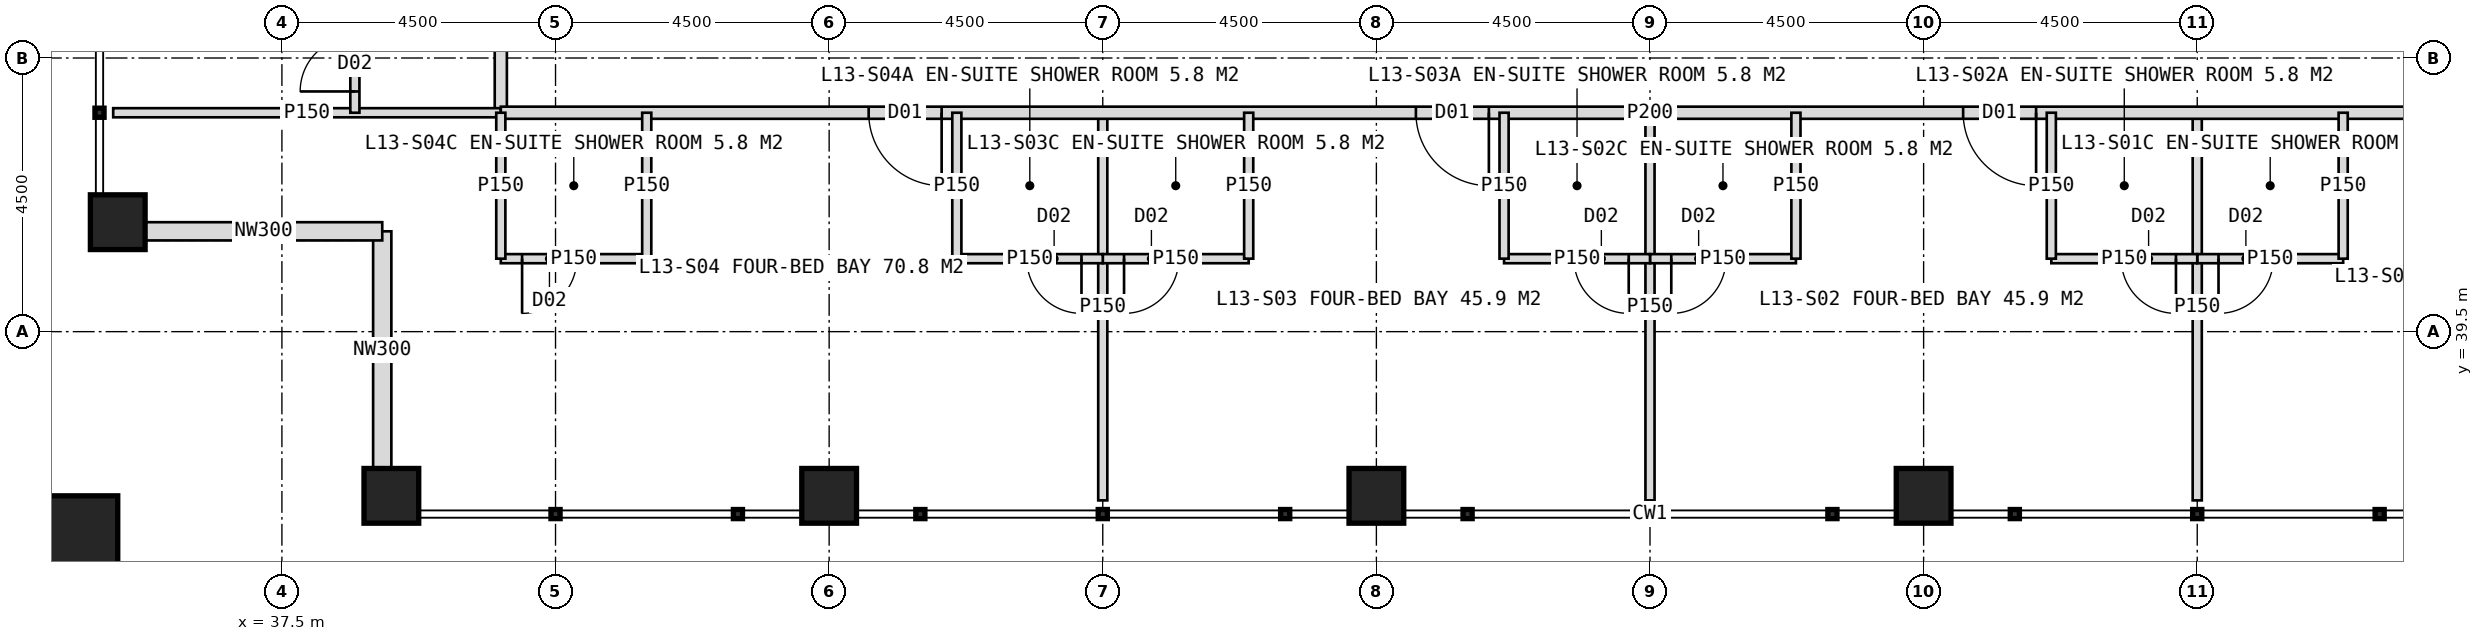
"""IFC4 building model, lengths in metres.
Left out: names, types, materials, properties, quantities, classifications, styles, units other than length and angle.
Written with IfcOpenShell. Run it as: python <this file> out.ifc"""

import sys

from ifc_helpers import new_model, si_unit, direction, frame, frame_2d, origin, origin_2d, place, context, subcontext, project, spatial, rectangle, hollow_rectangle, extrude, element, fill, save


model = new_model("IFC4")
c1 = context("Model", 3, precision=1e-05, world=origin(), true_north=direction((0.0, 1.0)))
c2 = subcontext(c1, "Body", "Model", "MODEL_VIEW")
j1 = project(units=[si_unit("LENGTHUNIT", "METRE"), si_unit("PLANEANGLEUNIT", "RADIAN")], contexts=[c1])
p1 = place(None, origin())
s1 = spatial("IfcSite", under=j1, at=p1, CompositionType="ELEMENT")
p2 = place(p1, origin())
s2 = spatial("IfcBuilding", under=s1, at=p2, CompositionType="ELEMENT")
p3 = place(p2, frame((0.0, 0.0, 59.0)))
s3 = spatial("IfcBuildingStorey", under=s2, at=p3, CompositionType="ELEMENT", Elevation=59.0)
for number, where, z_axis, x_axis in (
    (1, (39.3, 36.8, 0.0), (0.0, 0.0, 1.0), (1.0, 0.0, 0.0)),
    (2, (34.8, 41.3, 0.0), (0.0, 0.0, 1.0), (1.0, 0.0, 0.0)),
    (3, (46.5, 36.8, 0.0), (0.0, 0.0, 1.0), (1.0, 0.0, 0.0)),
    (4, (55.5, 36.8, 0.0), (0.0, 0.0, 1.0), (1.0, 0.0, 0.0)),
    (5, (64.5, 36.8, 0.0), (0.0, 0.0, 1.0), (1.0, 0.0, 0.0)),
):
    element("IfcColumn", number, at=place(p3, frame(where, z_axis=z_axis, x_axis=x_axis)), inside=s3, PredefinedType="COLUMN", context=c2, shape_type="SweptSolid", body=[
        extrude(hollow_rectangle(XDim=0.9, YDim=0.9, WallThickness=0.08, at=origin_2d()), origin(), (0.0, 0.0, 1.0), 4.0),
    ])
p4 = place(p3, frame((33.9, 35.9, 0.0), z_axis=(0.0, 0.0, 1.0), x_axis=(1.0, 0.0, 0.0)))
e6 = element("IfcColumn", 6, at=p4, inside=s3, PredefinedType="COLUMN", context=c2, shape_type="SweptSolid", body=[
    extrude(hollow_rectangle(XDim=1.8, YDim=1.8, WallThickness=0.1, at=origin_2d()), origin(), (0.0, 0.0, 1.0), 4.0),
])
for number, where, z_axis, x_axis in (
    (7, (39.15, 37.25, 0.0), (0.0, 0.0, 1.0), (0.0, 1.0, 0.0)),
    (8, (39.15, 41.15, 0.0), (0.0, 0.0, 1.0), (-1.0, 0.0, 0.0)),
):
    element("IfcWall", number, at=place(p3, frame(where, z_axis=z_axis, x_axis=x_axis)), inside=s3, PredefinedType="ELEMENTEDWALL", context=c2, shape_type="SweptSolid", body=[
        extrude(rectangle(XDim=3.9, YDim=0.3, at=frame_2d((1.95, 0.0))), origin(), (0.0, 0.0, 1.0), 2.95),
    ])
p5 = place(p3, frame((41.1, 43.1, 0.0), z_axis=(0.0, 0.0, 1.0), x_axis=(0.0, 1.0, 0.0)))
e9 = element("IfcWall", 9, at=p5, inside=s3, PredefinedType="PARTITIONING", context=c2, shape_type="SweptSolid", body=[
    extrude(rectangle(XDim=37.8, YDim=0.2, at=frame_2d((18.9, 0.0))), origin(), (0.0, 0.0, 1.0), 3.75),
])
p6 = place(p5, frame((3.25, 0.0, 0.0)))
e10 = element("IfcOpeningElement", 10, at=p6, cuts=e9, PredefinedType="OPENING", context=c2, shape_type="SweptSolid", body=[
    extrude(rectangle(XDim=1.2, YDim=2.2, at=frame_2d((0.6, 1.1))), frame((0.0, 0.11, 0.0), z_axis=(0.0, -1.0, 0.0), x_axis=(1.0, 0.0, 0.0)), (0.0, 0.0, 1.0), 0.22),
])
p7 = place(p5, frame((9.55, 0.0, 0.0)))
e11 = element("IfcOpeningElement", 11, at=p7, cuts=e9, PredefinedType="OPENING", context=c2, shape_type="SweptSolid", body=[
    extrude(rectangle(XDim=1.2, YDim=2.2, at=frame_2d((0.6, 1.1))), frame((0.0, 0.11, 0.0), z_axis=(0.0, -1.0, 0.0), x_axis=(1.0, 0.0, 0.0)), (0.0, 0.0, 1.0), 0.22),
])
p8 = place(p5, frame((15.55, 0.0, 0.0)))
e12 = element("IfcOpeningElement", 12, at=p8, cuts=e9, PredefinedType="OPENING", context=c2, shape_type="SweptSolid", body=[
    extrude(rectangle(XDim=1.2, YDim=2.2, at=frame_2d((0.6, 1.1))), frame((0.0, 0.11, 0.0), z_axis=(0.0, -1.0, 0.0), x_axis=(1.0, 0.0, 0.0)), (0.0, 0.0, 1.0), 0.22),
])
p9 = place(p5, frame((21.55, 0.0, 0.0)))
e13 = element("IfcOpeningElement", 13, at=p9, cuts=e9, PredefinedType="OPENING", context=c2, shape_type="SweptSolid", body=[
    extrude(rectangle(XDim=1.2, YDim=2.2, at=frame_2d((0.6, 1.1))), frame((0.0, 0.11, 0.0), z_axis=(0.0, -1.0, 0.0), x_axis=(1.0, 0.0, 0.0)), (0.0, 0.0, 1.0), 0.22),
])
p10 = place(p5, frame((27.55, 0.0, 0.0)))
e14 = element("IfcOpeningElement", 14, at=p10, cuts=e9, PredefinedType="OPENING", context=c2, shape_type="SweptSolid", body=[
    extrude(rectangle(XDim=1.2, YDim=2.2, at=frame_2d((0.6, 1.1))), frame((0.0, 0.11, 0.0), z_axis=(0.0, -1.0, 0.0), x_axis=(1.0, 0.0, 0.0)), (0.0, 0.0, 1.0), 0.22),
])
p11 = place(p3, frame((41.1, 43.1, 0.0), z_axis=(0.0, 0.0, 1.0), x_axis=(-1.0, 0.0, 0.0)))
e15 = element("IfcWall", 15, at=p11, inside=s3, PredefinedType="PARTITIONING", context=c2, shape_type="SweptSolid", body=[
    extrude(rectangle(XDim=6.375, YDim=0.15, at=frame_2d((3.188, 0.0))), origin(), (0.0, 0.0, 1.0), 3.75),
])
p12 = place(p3, frame((38.7, 43.1, 0.0), z_axis=(0.0, 0.0, 1.0), x_axis=(0.0, 1.0, 0.0)))
e16 = element("IfcWall", 16, at=p12, inside=s3, PredefinedType="PARTITIONING", context=c2, shape_type="SweptSolid", body=[
    extrude(rectangle(XDim=3.0, YDim=0.15, at=frame_2d((1.5, 0.0))), origin(), (0.0, 0.0, 1.0), 3.75),
])
p13 = place(p12, frame((0.35, 0.0, 0.0)))
e17 = element("IfcOpeningElement", 17, at=p13, cuts=e16, PredefinedType="OPENING", context=c2, shape_type="SweptSolid", body=[
    extrude(rectangle(XDim=0.9, YDim=2.1, at=frame_2d((0.45, 1.05))), frame((0.0, 0.085, 0.0), z_axis=(0.0, -1.0, 0.0), x_axis=(1.0, 0.0, 0.0)), (0.0, 0.0, 1.0), 0.17),
])
p14 = place(p3, frame((69.0, 43.1, 0.0), z_axis=(0.0, 0.0, 1.0), x_axis=(0.0, -1.0, 0.0)))
e18 = element("IfcWall", 18, at=p14, inside=s3, PredefinedType="PARTITIONING", context=c2, shape_type="SweptSolid", body=[
    extrude(rectangle(XDim=6.375, YDim=0.15, at=frame_2d((3.188, 0.0))), origin(), (0.0, 0.0, 1.0), 3.75),
])
p15 = place(p3, frame((60.0, 43.1, 0.0), z_axis=(0.0, 0.0, 1.0), x_axis=(0.0, -1.0, 0.0)))
e19 = element("IfcWall", 19, at=p15, inside=s3, PredefinedType="PARTITIONING", context=c2, shape_type="SweptSolid", body=[
    extrude(rectangle(XDim=6.375, YDim=0.15, at=frame_2d((3.188, 0.0))), origin(), (0.0, 0.0, 1.0), 2.75),
])
p16 = place(p3, frame((51.0, 43.1, 0.0), z_axis=(0.0, 0.0, 1.0), x_axis=(0.0, -1.0, 0.0)))
e20 = element("IfcWall", 20, at=p16, inside=s3, PredefinedType="PARTITIONING", context=c2, shape_type="SweptSolid", body=[
    extrude(rectangle(XDim=6.375, YDim=0.15, at=frame_2d((3.188, 0.0))), origin(), (0.0, 0.0, 1.0), 3.75),
])
p17 = place(p3, frame((78.9, 43.1, 0.0), z_axis=(0.0, 0.0, 1.0), x_axis=(-1.0, 0.0, 0.0)))
e21 = element("IfcWall", 21, at=p17, inside=s3, PredefinedType="PARTITIONING", context=c2, shape_type="SweptSolid", body=[
    extrude(rectangle(XDim=37.8, YDim=0.2, at=frame_2d((18.9, 0.0))), origin(), (0.0, 0.0, 1.0), 3.75),
])
p18 = place(p17, frame((2.65, 0.0, 0.0)))
e22 = element("IfcOpeningElement", 22, at=p18, cuts=e21, PredefinedType="OPENING", context=c2, shape_type="SweptSolid", body=[
    extrude(rectangle(XDim=1.2, YDim=2.2, at=frame_2d((0.6, 1.1))), frame((0.0, 0.11, 0.0), z_axis=(0.0, -1.0, 0.0), x_axis=(1.0, 0.0, 0.0)), (0.0, 0.0, 1.0), 0.22),
])
p19 = place(p17, frame((12.55, 0.0, 0.0)))
e23 = element("IfcOpeningElement", 23, at=p19, cuts=e21, PredefinedType="OPENING", context=c2, shape_type="SweptSolid", body=[
    extrude(rectangle(XDim=1.2, YDim=2.2, at=frame_2d((0.6, 1.1))), frame((0.0, 0.11, 0.0), z_axis=(0.0, -1.0, 0.0), x_axis=(1.0, 0.0, 0.0)), (0.0, 0.0, 1.0), 0.22),
])
p20 = place(p17, frame((21.55, 0.0, 0.0)))
e24 = element("IfcOpeningElement", 24, at=p20, cuts=e21, PredefinedType="OPENING", context=c2, shape_type="SweptSolid", body=[
    extrude(rectangle(XDim=1.2, YDim=2.2, at=frame_2d((0.6, 1.1))), frame((0.0, 0.11, 0.0), z_axis=(0.0, -1.0, 0.0), x_axis=(1.0, 0.0, 0.0)), (0.0, 0.0, 1.0), 0.22),
])
p21 = place(p17, frame((30.55, 0.0, 0.0)))
e25 = element("IfcOpeningElement", 25, at=p21, cuts=e21, PredefinedType="OPENING", context=c2, shape_type="SweptSolid", body=[
    extrude(rectangle(XDim=1.2, YDim=2.2, at=frame_2d((0.6, 1.1))), frame((0.0, 0.11, 0.0), z_axis=(0.0, -1.0, 0.0), x_axis=(1.0, 0.0, 0.0)), (0.0, 0.0, 1.0), 0.22),
])
p22 = place(p3, frame((71.4, 40.7, 0.0), z_axis=(0.0, 0.0, 1.0), x_axis=(-1.0, 0.0, 0.0)))
e26 = element("IfcWall", 26, at=p22, inside=s3, PredefinedType="PARTITIONING", context=c2, shape_type="SweptSolid", body=[
    extrude(rectangle(XDim=2.4, YDim=0.15, at=frame_2d((1.2, 0.0))), origin(), (0.0, 0.0, 1.0), 3.75),
])
p23 = place(p22, frame((1.15, 0.0, 0.0)))
e27 = element("IfcOpeningElement", 27, at=p23, cuts=e26, PredefinedType="OPENING", context=c2, shape_type="SweptSolid", body=[
    extrude(rectangle(XDim=0.9, YDim=2.1, at=frame_2d((0.45, 1.05))), frame((0.0, 0.085, 0.0), z_axis=(0.0, -1.0, 0.0), x_axis=(1.0, 0.0, 0.0)), (0.0, 0.0, 1.0), 0.17),
])
p24 = place(p3, frame((71.4, 43.1, 0.0), z_axis=(0.0, 0.0, 1.0), x_axis=(0.0, -1.0, 0.0)))
e28 = element("IfcWall", 28, at=p24, inside=s3, PredefinedType="PARTITIONING", context=c2, shape_type="SweptSolid", body=[
    extrude(rectangle(XDim=2.4, YDim=0.15, at=frame_2d((1.2, 0.0))), origin(), (0.0, 0.0, 1.0), 3.75),
])
p25 = place(p3, frame((69.0, 40.7, 0.0), z_axis=(0.0, 0.0, 1.0), x_axis=(-1.0, 0.0, 0.0)))
e29 = element("IfcWall", 29, at=p25, inside=s3, PredefinedType="PARTITIONING", context=c2, shape_type="SweptSolid", body=[
    extrude(rectangle(XDim=2.4, YDim=0.15, at=frame_2d((1.2, 0.0))), origin(), (0.0, 0.0, 1.0), 3.75),
])
p26 = place(p25, frame((0.35, 0.0, 0.0)))
e30 = element("IfcOpeningElement", 30, at=p26, cuts=e29, PredefinedType="OPENING", context=c2, shape_type="SweptSolid", body=[
    extrude(rectangle(XDim=0.9, YDim=2.1, at=frame_2d((0.45, 1.05))), frame((0.0, 0.085, 0.0), z_axis=(0.0, -1.0, 0.0), x_axis=(1.0, 0.0, 0.0)), (0.0, 0.0, 1.0), 0.17),
])
p27 = place(p3, frame((66.6, 43.1, 0.0), z_axis=(0.0, 0.0, 1.0), x_axis=(0.0, -1.0, 0.0)))
e31 = element("IfcWall", 31, at=p27, inside=s3, PredefinedType="PARTITIONING", context=c2, shape_type="SweptSolid", body=[
    extrude(rectangle(XDim=2.4, YDim=0.15, at=frame_2d((1.2, 0.0))), origin(), (0.0, 0.0, 1.0), 3.75),
])
p28 = place(p3, frame((62.4, 40.7, 0.0), z_axis=(0.0, 0.0, 1.0), x_axis=(-1.0, 0.0, 0.0)))
e32 = element("IfcWall", 32, at=p28, inside=s3, PredefinedType="PARTITIONING", context=c2, shape_type="SweptSolid", body=[
    extrude(rectangle(XDim=2.4, YDim=0.15, at=frame_2d((1.2, 0.0))), origin(), (0.0, 0.0, 1.0), 3.75),
])
p29 = place(p28, frame((1.15, 0.0, 0.0)))
e33 = element("IfcOpeningElement", 33, at=p29, cuts=e32, PredefinedType="OPENING", context=c2, shape_type="SweptSolid", body=[
    extrude(rectangle(XDim=0.9, YDim=2.1, at=frame_2d((0.45, 1.05))), frame((0.0, 0.085, 0.0), z_axis=(0.0, -1.0, 0.0), x_axis=(1.0, 0.0, 0.0)), (0.0, 0.0, 1.0), 0.17),
])
p30 = place(p3, frame((62.4, 43.1, 0.0), z_axis=(0.0, 0.0, 1.0), x_axis=(0.0, -1.0, 0.0)))
e34 = element("IfcWall", 34, at=p30, inside=s3, PredefinedType="PARTITIONING", context=c2, shape_type="SweptSolid", body=[
    extrude(rectangle(XDim=2.4, YDim=0.15, at=frame_2d((1.2, 0.0))), origin(), (0.0, 0.0, 1.0), 3.75),
])
p31 = place(p3, frame((60.0, 40.7, 0.0), z_axis=(0.0, 0.0, 1.0), x_axis=(-1.0, 0.0, 0.0)))
e35 = element("IfcWall", 35, at=p31, inside=s3, PredefinedType="PARTITIONING", context=c2, shape_type="SweptSolid", body=[
    extrude(rectangle(XDim=2.4, YDim=0.15, at=frame_2d((1.2, 0.0))), origin(), (0.0, 0.0, 1.0), 3.75),
])
p32 = place(p31, frame((0.35, 0.0, 0.0)))
e36 = element("IfcOpeningElement", 36, at=p32, cuts=e35, PredefinedType="OPENING", context=c2, shape_type="SweptSolid", body=[
    extrude(rectangle(XDim=0.9, YDim=2.1, at=frame_2d((0.45, 1.05))), frame((0.0, 0.085, 0.0), z_axis=(0.0, -1.0, 0.0), x_axis=(1.0, 0.0, 0.0)), (0.0, 0.0, 1.0), 0.17),
])
p33 = place(p3, frame((57.6, 43.1, 0.0), z_axis=(0.0, 0.0, 1.0), x_axis=(0.0, -1.0, 0.0)))
e37 = element("IfcWall", 37, at=p33, inside=s3, PredefinedType="PARTITIONING", context=c2, shape_type="SweptSolid", body=[
    extrude(rectangle(XDim=2.4, YDim=0.15, at=frame_2d((1.2, 0.0))), origin(), (0.0, 0.0, 1.0), 3.75),
])
p34 = place(p3, frame((53.4, 40.7, 0.0), z_axis=(0.0, 0.0, 1.0), x_axis=(-1.0, 0.0, 0.0)))
e38 = element("IfcWall", 38, at=p34, inside=s3, PredefinedType="PARTITIONING", context=c2, shape_type="SweptSolid", body=[
    extrude(rectangle(XDim=2.4, YDim=0.15, at=frame_2d((1.2, 0.0))), origin(), (0.0, 0.0, 1.0), 3.75),
])
p35 = place(p34, frame((1.15, 0.0, 0.0)))
e39 = element("IfcOpeningElement", 39, at=p35, cuts=e38, PredefinedType="OPENING", context=c2, shape_type="SweptSolid", body=[
    extrude(rectangle(XDim=0.9, YDim=2.1, at=frame_2d((0.45, 1.05))), frame((0.0, 0.085, 0.0), z_axis=(0.0, -1.0, 0.0), x_axis=(1.0, 0.0, 0.0)), (0.0, 0.0, 1.0), 0.17),
])
p36 = place(p3, frame((53.4, 43.1, 0.0), z_axis=(0.0, 0.0, 1.0), x_axis=(0.0, -1.0, 0.0)))
e40 = element("IfcWall", 40, at=p36, inside=s3, PredefinedType="PARTITIONING", context=c2, shape_type="SweptSolid", body=[
    extrude(rectangle(XDim=2.4, YDim=0.15, at=frame_2d((1.2, 0.0))), origin(), (0.0, 0.0, 1.0), 3.75),
])
p37 = place(p3, frame((51.0, 40.7, 0.0), z_axis=(0.0, 0.0, 1.0), x_axis=(-1.0, 0.0, 0.0)))
e41 = element("IfcWall", 41, at=p37, inside=s3, PredefinedType="PARTITIONING", context=c2, shape_type="SweptSolid", body=[
    extrude(rectangle(XDim=2.4, YDim=0.15, at=frame_2d((1.2, 0.0))), origin(), (0.0, 0.0, 1.0), 3.75),
])
p38 = place(p37, frame((0.35, 0.0, 0.0)))
e42 = element("IfcOpeningElement", 42, at=p38, cuts=e41, PredefinedType="OPENING", context=c2, shape_type="SweptSolid", body=[
    extrude(rectangle(XDim=0.9, YDim=2.1, at=frame_2d((0.45, 1.05))), frame((0.0, 0.085, 0.0), z_axis=(0.0, -1.0, 0.0), x_axis=(1.0, 0.0, 0.0)), (0.0, 0.0, 1.0), 0.17),
])
p39 = place(p3, frame((48.6, 43.1, 0.0), z_axis=(0.0, 0.0, 1.0), x_axis=(0.0, -1.0, 0.0)))
e43 = element("IfcWall", 43, at=p39, inside=s3, PredefinedType="PARTITIONING", context=c2, shape_type="SweptSolid", body=[
    extrude(rectangle(XDim=2.4, YDim=0.15, at=frame_2d((1.2, 0.0))), origin(), (0.0, 0.0, 1.0), 3.75),
])
p40 = place(p3, frame((43.5, 40.7, 0.0), z_axis=(0.0, 0.0, 1.0), x_axis=(-1.0, 0.0, 0.0)))
e44 = element("IfcWall", 44, at=p40, inside=s3, PredefinedType="PARTITIONING", context=c2, shape_type="SweptSolid", body=[
    extrude(rectangle(XDim=2.4, YDim=0.15, at=frame_2d((1.2, 0.0))), origin(), (0.0, 0.0, 1.0), 3.75),
])
p41 = place(p40, frame((1.15, 0.0, 0.0)))
e45 = element("IfcOpeningElement", 45, at=p41, cuts=e44, PredefinedType="OPENING", context=c2, shape_type="SweptSolid", body=[
    extrude(rectangle(XDim=0.9, YDim=2.1, at=frame_2d((0.45, 1.05))), frame((0.0, 0.085, 0.0), z_axis=(0.0, -1.0, 0.0), x_axis=(1.0, 0.0, 0.0)), (0.0, 0.0, 1.0), 0.17),
])
for number, where, z_axis, x_axis in (
    (46, (43.5, 43.1, 0.0), (0.0, 0.0, 1.0), (0.0, -1.0, 0.0)),
    (47, (41.1, 43.1, 0.0), (0.0, 0.0, 1.0), (0.0, -1.0, 0.0)),
):
    element("IfcWall", number, at=place(p3, frame(where, z_axis=z_axis, x_axis=x_axis)), inside=s3, PredefinedType="PARTITIONING", context=c2, shape_type="SweptSolid", body=[
        extrude(rectangle(XDim=2.4, YDim=0.15, at=frame_2d((1.2, 0.0))), origin(), (0.0, 0.0, 1.0), 3.75),
    ])
p42 = place(p13, origin())
e48 = element("IfcDoor", 48, at=p42, inside=s3, OperationType="SINGLE_SWING_LEFT", PredefinedType="DOOR", context=c2, shape_type="SweptSolid", body=[
    extrude(rectangle(XDim=0.9, YDim=2.1, at=frame_2d((0.45, 1.05))), frame((0.0, 0.025, 0.0), z_axis=(0.0, -1.0, 0.0), x_axis=(1.0, 0.0, 0.0)), (0.0, 0.0, 1.0), 0.05),
])
fill(e17, e48)
p43 = place(p23, origin())
e49 = element("IfcDoor", 49, at=p43, inside=s3, OperationType="SINGLE_SWING_RIGHT", PredefinedType="DOOR", context=c2, shape_type="SweptSolid", body=[
    extrude(rectangle(XDim=0.9, YDim=2.1, at=frame_2d((0.45, 1.05))), frame((0.0, 0.025, 0.0), z_axis=(0.0, -1.0, 0.0), x_axis=(1.0, 0.0, 0.0)), (0.0, 0.0, 1.0), 0.05),
])
fill(e27, e49)
p44 = place(p19, origin())
e50 = element("IfcDoor", 50, at=p44, inside=s3, OperationType="SINGLE_SWING_LEFT", PredefinedType="DOOR", context=c2, shape_type="SweptSolid", body=[
    extrude(rectangle(XDim=1.2, YDim=2.2, at=frame_2d((0.6, 1.1))), frame((0.0, 0.025, 0.0), z_axis=(0.0, -1.0, 0.0), x_axis=(1.0, 0.0, 0.0)), (0.0, 0.0, 1.0), 0.05),
])
fill(e23, e50)
p45 = place(p26, origin())
e51 = element("IfcDoor", 51, at=p45, inside=s3, OperationType="SINGLE_SWING_LEFT", PredefinedType="DOOR", context=c2, shape_type="SweptSolid", body=[
    extrude(rectangle(XDim=0.9, YDim=2.1, at=frame_2d((0.45, 1.05))), frame((0.0, 0.025, 0.0), z_axis=(0.0, -1.0, 0.0), x_axis=(1.0, 0.0, 0.0)), (0.0, 0.0, 1.0), 0.05),
])
fill(e30, e51)
p46 = place(p29, origin())
e52 = element("IfcDoor", 52, at=p46, inside=s3, OperationType="SINGLE_SWING_RIGHT", PredefinedType="DOOR", context=c2, shape_type="SweptSolid", body=[
    extrude(rectangle(XDim=0.9, YDim=2.1, at=frame_2d((0.45, 1.05))), frame((0.0, 0.025, 0.0), z_axis=(0.0, -1.0, 0.0), x_axis=(1.0, 0.0, 0.0)), (0.0, 0.0, 1.0), 0.05),
])
fill(e33, e52)
p47 = place(p20, origin())
e53 = element("IfcDoor", 53, at=p47, inside=s3, OperationType="SINGLE_SWING_LEFT", PredefinedType="DOOR", context=c2, shape_type="SweptSolid", body=[
    extrude(rectangle(XDim=1.2, YDim=2.2, at=frame_2d((0.6, 1.1))), frame((0.0, 0.025, 0.0), z_axis=(0.0, -1.0, 0.0), x_axis=(1.0, 0.0, 0.0)), (0.0, 0.0, 1.0), 0.05),
])
fill(e24, e53)
p48 = place(p32, origin())
e54 = element("IfcDoor", 54, at=p48, inside=s3, OperationType="SINGLE_SWING_LEFT", PredefinedType="DOOR", context=c2, shape_type="SweptSolid", body=[
    extrude(rectangle(XDim=0.9, YDim=2.1, at=frame_2d((0.45, 1.05))), frame((0.0, 0.025, 0.0), z_axis=(0.0, -1.0, 0.0), x_axis=(1.0, 0.0, 0.0)), (0.0, 0.0, 1.0), 0.05),
])
fill(e36, e54)
p49 = place(p35, origin())
e55 = element("IfcDoor", 55, at=p49, inside=s3, OperationType="SINGLE_SWING_RIGHT", PredefinedType="DOOR", context=c2, shape_type="SweptSolid", body=[
    extrude(rectangle(XDim=0.9, YDim=2.1, at=frame_2d((0.45, 1.05))), frame((0.0, 0.025, 0.0), z_axis=(0.0, -1.0, 0.0), x_axis=(1.0, 0.0, 0.0)), (0.0, 0.0, 1.0), 0.05),
])
fill(e39, e55)
p50 = place(p21, origin())
e56 = element("IfcDoor", 56, at=p50, inside=s3, OperationType="SINGLE_SWING_LEFT", PredefinedType="DOOR", context=c2, shape_type="SweptSolid", body=[
    extrude(rectangle(XDim=1.2, YDim=2.2, at=frame_2d((0.6, 1.1))), frame((0.0, 0.025, 0.0), z_axis=(0.0, -1.0, 0.0), x_axis=(1.0, 0.0, 0.0)), (0.0, 0.0, 1.0), 0.05),
])
fill(e25, e56)
p51 = place(p38, origin())
e57 = element("IfcDoor", 57, at=p51, inside=s3, OperationType="SINGLE_SWING_LEFT", PredefinedType="DOOR", context=c2, shape_type="SweptSolid", body=[
    extrude(rectangle(XDim=0.9, YDim=2.1, at=frame_2d((0.45, 1.05))), frame((0.0, 0.025, 0.0), z_axis=(0.0, -1.0, 0.0), x_axis=(1.0, 0.0, 0.0)), (0.0, 0.0, 1.0), 0.05),
])
fill(e42, e57)
p52 = place(p41, origin())
e58 = element("IfcDoor", 58, at=p52, inside=s3, OperationType="SINGLE_SWING_RIGHT", PredefinedType="DOOR", context=c2, shape_type="SweptSolid", body=[
    extrude(rectangle(XDim=0.9, YDim=2.1, at=frame_2d((0.45, 1.05))), frame((0.0, 0.025, 0.0), z_axis=(0.0, -1.0, 0.0), x_axis=(1.0, 0.0, 0.0)), (0.0, 0.0, 1.0), 0.05),
])
fill(e45, e58)
save(model, sys.argv[1])
